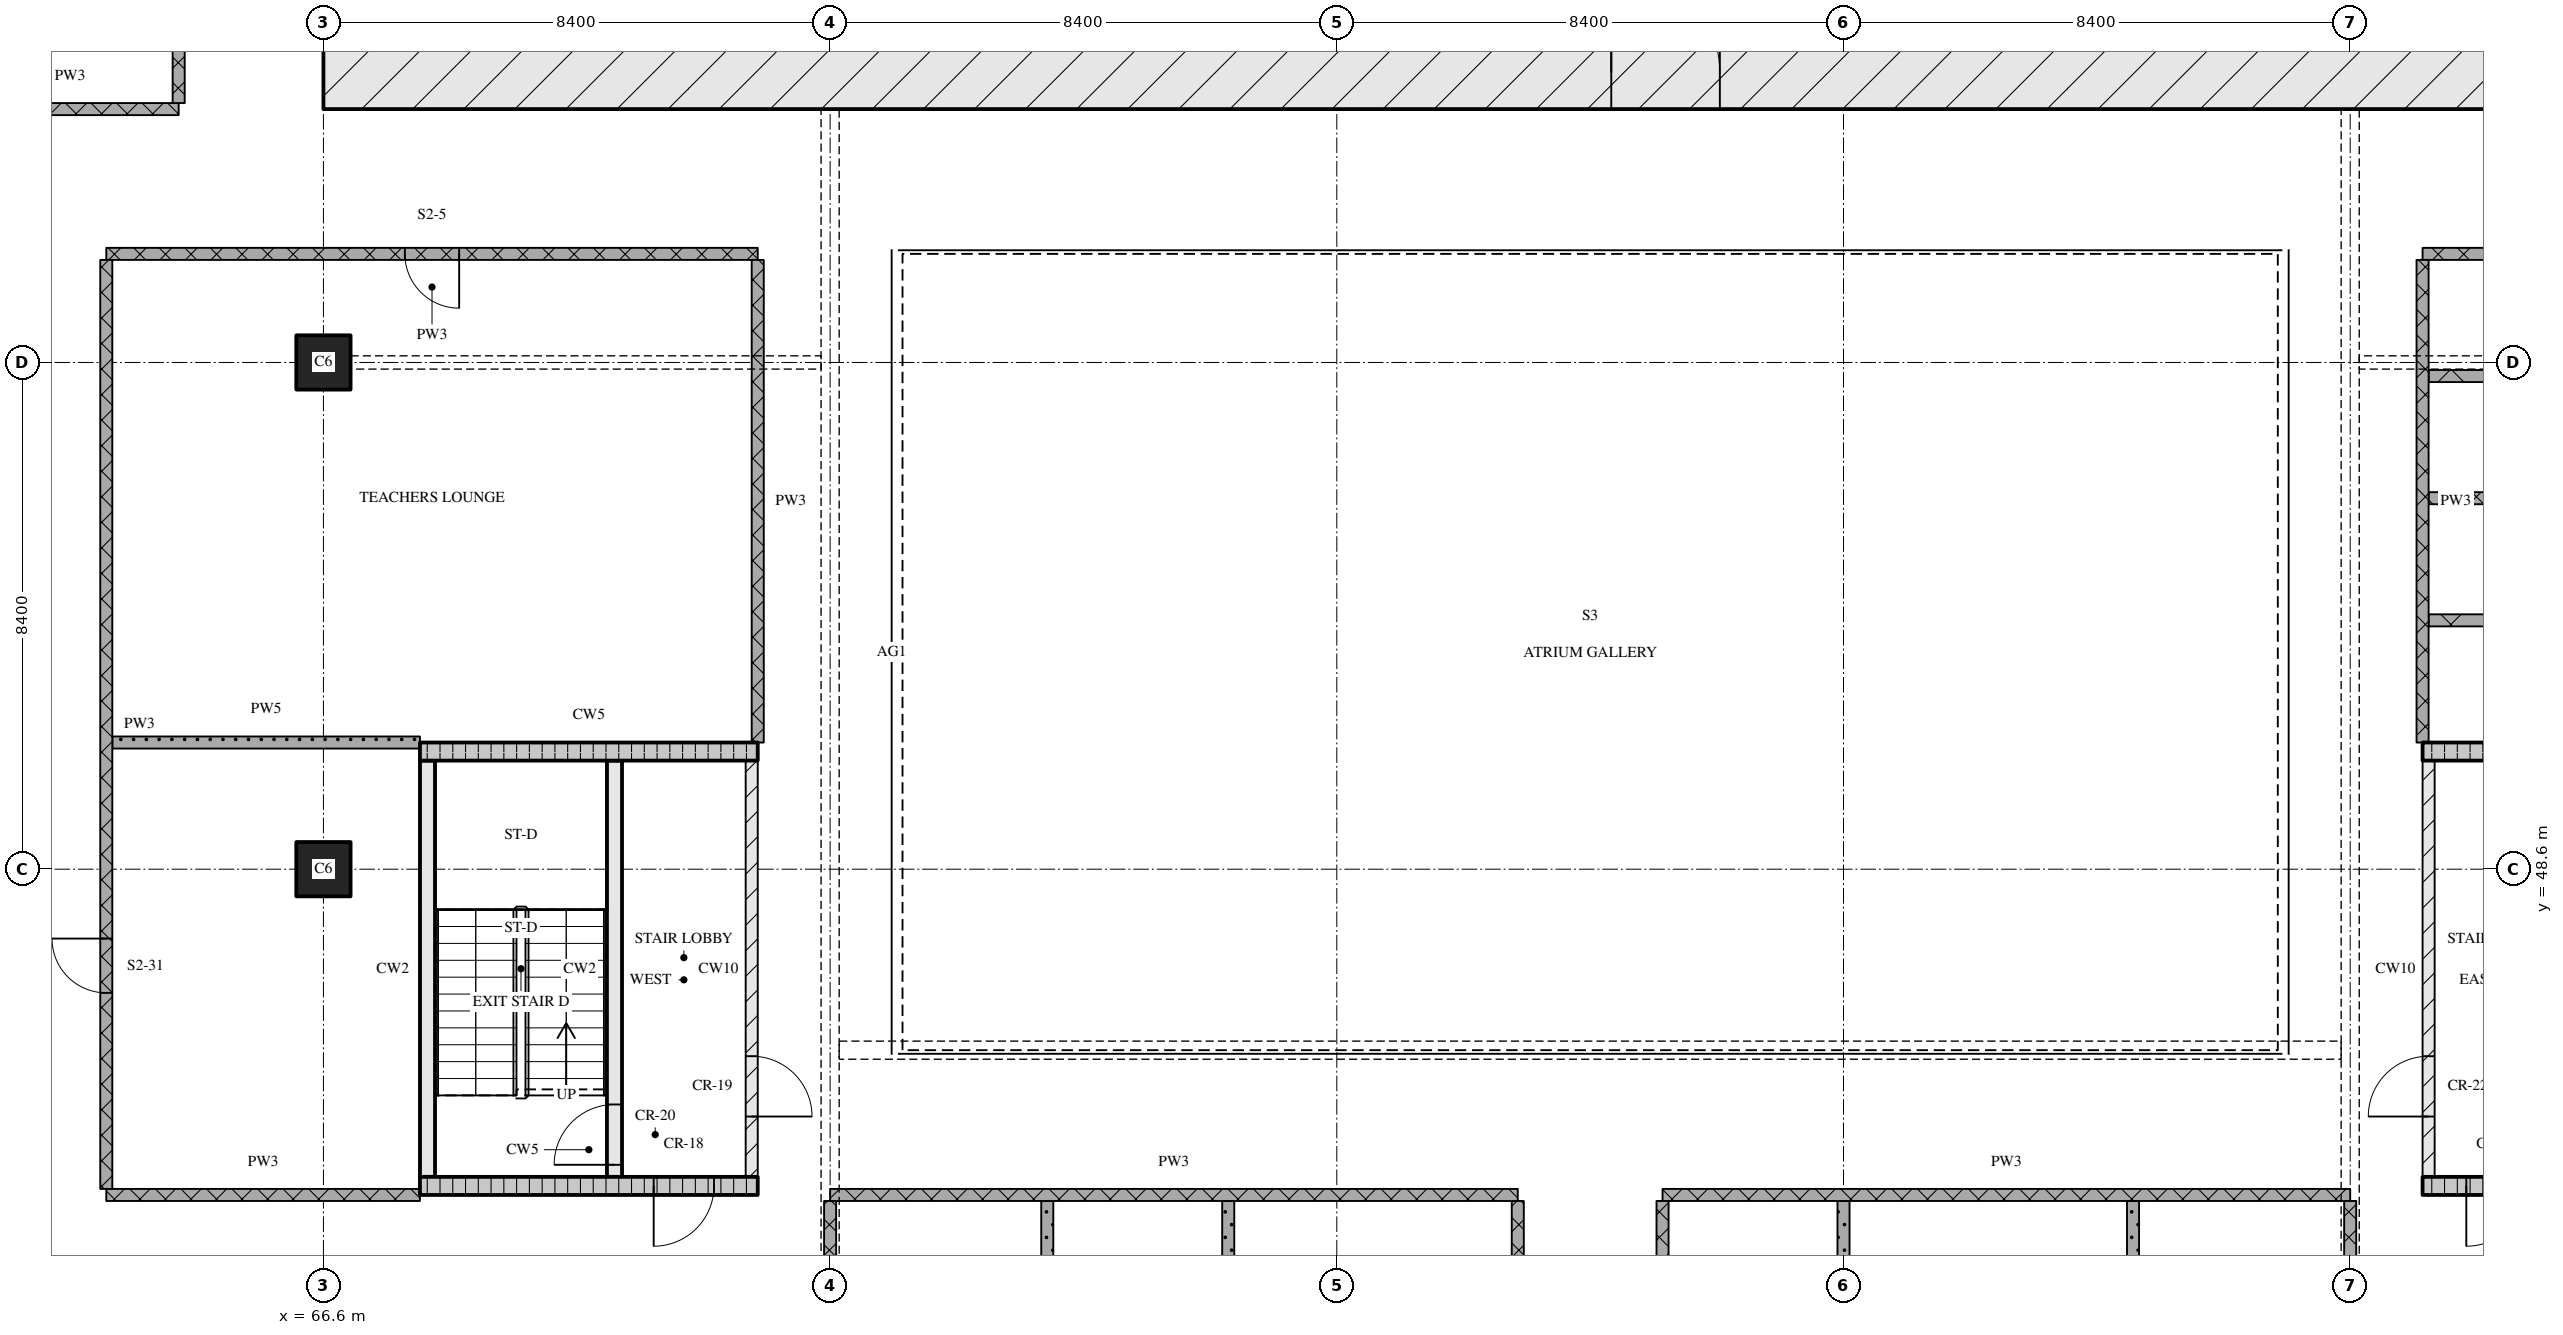
"""IFC4 building model, lengths in metres.
Left out: names, types, materials, properties, quantities, classifications, styles, units other than length and angle.
Written with IfcOpenShell. Run it as: python <this file> out.ifc"""

import sys

from ifc_helpers import new_model, si_unit, direction, frame, frame_2d, origin, origin_2d, place, context, subcontext, project, spatial, rectangle, extrude, element, fill, save


model = new_model("IFC4")
c1 = context("Model", 3, precision=1e-05, world=origin(), true_north=direction((0.0, 1.0)))
c2 = subcontext(c1, "Body", "Model", "MODEL_VIEW")
j1 = project(units=[si_unit("LENGTHUNIT", "METRE"), si_unit("PLANEANGLEUNIT", "RADIAN")], contexts=[c1])
p1 = place(None, origin())
s1 = spatial("IfcSite", under=j1, at=p1, CompositionType="ELEMENT")
p2 = place(p1, origin())
s2 = spatial("IfcBuilding", under=s1, at=p2, CompositionType="ELEMENT")
p3 = place(p2, frame((0.0, 0.0, 23.7)))
s3 = spatial("IfcBuildingStorey", under=s2, at=p3, CompositionType="ELEMENT", Elevation=23.7)
for number, where, z_axis, x_axis in (
    (1, (66.6, 48.6, 0.0), (0.0, 0.0, 1.0), (1.0, 0.0, 0.0)),
    (2, (66.6, 57.0, 0.0), (0.0, 0.0, 1.0), (1.0, 0.0, 0.0)),
):
    element("IfcColumn", number, at=place(p3, frame(where, z_axis=z_axis, x_axis=x_axis)), inside=s3, PredefinedType="COLUMN", context=c2, shape_type="SweptSolid", body=[
        extrude(rectangle(XDim=0.9, YDim=0.9, at=origin_2d()), origin(), (0.0, 0.0, 1.0), 4.5),
    ])
p4 = place(p3, frame((66.6, 61.8, 0.0), z_axis=(0.0, 0.0, 1.0), x_axis=(1.0, 0.0, 0.0)))
e3 = element("IfcWall", 3, at=p4, inside=s3, PredefinedType="SOLIDWALL", context=c2, shape_type="SweptSolid", body=[
    extrude(rectangle(XDim=42.0, YDim=1.2, at=frame_2d((21.0, 0.0))), origin(), (0.0, 0.0, 1.0), 4.2),
])
p5 = place(p4, frame((21.35, 0.0, 0.0)))
e4 = element("IfcOpeningElement", 4, at=p5, cuts=e3, PredefinedType="OPENING", context=c2, shape_type="SweptSolid", body=[
    extrude(rectangle(XDim=1.8, YDim=2.1, at=frame_2d((0.9, 1.05))), frame((0.0, 0.61, 0.0), z_axis=(0.0, -1.0, 0.0), x_axis=(1.0, 0.0, 0.0)), (0.0, 0.0, 1.0), 1.22),
])
p6 = place(p3, frame((68.2, 43.35, 0.0), z_axis=(0.0, 0.0, 1.0), x_axis=(1.0, 0.0, 0.0)))
e5 = element("IfcWall", 5, at=p6, inside=s3, PredefinedType="SOLIDWALL", context=c2, shape_type="SweptSolid", body=[
    extrude(rectangle(XDim=5.6, YDim=0.3, at=frame_2d((2.8, 0.0))), origin(), (0.0, 0.0, 1.0), 4.2),
])
p7 = place(p6, frame((3.875, 0.0, 0.0)))
e6 = element("IfcOpeningElement", 6, at=p7, cuts=e5, PredefinedType="OPENING", context=c2, shape_type="SweptSolid", body=[
    extrude(rectangle(XDim=1.0, YDim=2.1, at=frame_2d((0.5, 1.05))), frame((0.0, 0.16, 0.0), z_axis=(0.0, -1.0, 0.0), x_axis=(1.0, 0.0, 0.0)), (0.0, 0.0, 1.0), 0.32),
])
p8 = place(p3, frame((68.325, 43.5, 0.0), z_axis=(0.0, 0.0, 1.0), x_axis=(0.0, 1.0, 0.0)))
e7 = element("IfcWall", 7, at=p8, inside=s3, PredefinedType="SOLIDWALL", context=c2, shape_type="SweptSolid", body=[
    extrude(rectangle(XDim=6.9, YDim=0.25, at=frame_2d((3.45, 0.0))), origin(), (0.0, 0.0, 1.0), 4.2),
])
p9 = place(p3, frame((71.425, 43.5, 0.0), z_axis=(0.0, 0.0, 1.0), x_axis=(0.0, 1.0, 0.0)))
e8 = element("IfcWall", 8, at=p9, inside=s3, PredefinedType="SOLIDWALL", context=c2, shape_type="SweptSolid", body=[
    extrude(rectangle(XDim=6.9, YDim=0.25, at=frame_2d((3.45, 0.0))), origin(), (0.0, 0.0, 1.0), 4.2),
])
p10 = place(p9, frame((0.2, 0.0, 0.0)))
e9 = element("IfcOpeningElement", 9, at=p10, cuts=e8, PredefinedType="OPENING", context=c2, shape_type="SweptSolid", body=[
    extrude(rectangle(XDim=1.0, YDim=2.1, at=frame_2d((0.5, 1.05))), frame((0.0, 0.135, 0.0), z_axis=(0.0, -1.0, 0.0), x_axis=(1.0, 0.0, 0.0)), (0.0, 0.0, 1.0), 0.27),
])
p11 = place(p3, frame((73.7, 43.5, 0.0), z_axis=(0.0, 0.0, 1.0), x_axis=(0.0, 1.0, 0.0)))
e10 = element("IfcWall", 10, at=p11, inside=s3, PredefinedType="PARTITIONING", context=c2, shape_type="SweptSolid", body=[
    extrude(rectangle(XDim=6.9, YDim=0.2, at=frame_2d((3.45, 0.0))), origin(), (0.0, 0.0, 1.0), 4.2),
])
p12 = place(p11, frame((1.0, 0.0, 0.0)))
e11 = element("IfcOpeningElement", 11, at=p12, cuts=e10, PredefinedType="OPENING", context=c2, shape_type="SweptSolid", body=[
    extrude(rectangle(XDim=1.0, YDim=2.1, at=frame_2d((0.5, 1.05))), frame((0.0, 0.11, 0.0), z_axis=(0.0, -1.0, 0.0), x_axis=(1.0, 0.0, 0.0)), (0.0, 0.0, 1.0), 0.22),
])
p13 = place(p3, frame((68.2, 50.55, 0.0), z_axis=(0.0, 0.0, 1.0), x_axis=(1.0, 0.0, 0.0)))
e12 = element("IfcWall", 12, at=p13, inside=s3, PredefinedType="SOLIDWALL", context=c2, shape_type="SweptSolid", body=[
    extrude(rectangle(XDim=5.6, YDim=0.3, at=frame_2d((2.8, 0.0))), origin(), (0.0, 0.0, 1.0), 4.2),
])
p14 = place(p3, frame((101.4, 43.35, 0.0), z_axis=(0.0, 0.0, 1.0), x_axis=(1.0, 0.0, 0.0)))
e13 = element("IfcWall", 13, at=p14, inside=s3, PredefinedType="SOLIDWALL", context=c2, shape_type="SweptSolid", body=[
    extrude(rectangle(XDim=5.6, YDim=0.3, at=frame_2d((2.8, 0.0))), origin(), (0.0, 0.0, 1.0), 4.2),
])
p15 = place(p14, frame((0.725, 0.0, 0.0)))
e14 = element("IfcOpeningElement", 14, at=p15, cuts=e13, PredefinedType="OPENING", context=c2, shape_type="SweptSolid", body=[
    extrude(rectangle(XDim=1.0, YDim=2.1, at=frame_2d((0.5, 1.05))), frame((0.0, 0.16, 0.0), z_axis=(0.0, -1.0, 0.0), x_axis=(1.0, 0.0, 0.0)), (0.0, 0.0, 1.0), 0.32),
])
p16 = place(p3, frame((101.5, 43.5, 0.0), z_axis=(0.0, 0.0, 1.0), x_axis=(0.0, 1.0, 0.0)))
e15 = element("IfcWall", 15, at=p16, inside=s3, PredefinedType="PARTITIONING", context=c2, shape_type="SweptSolid", body=[
    extrude(rectangle(XDim=6.9, YDim=0.2, at=frame_2d((3.45, 0.0))), origin(), (0.0, 0.0, 1.0), 4.2),
])
p17 = place(p16, frame((1.0, 0.0, 0.0)))
e16 = element("IfcOpeningElement", 16, at=p17, cuts=e15, PredefinedType="OPENING", context=c2, shape_type="SweptSolid", body=[
    extrude(rectangle(XDim=1.0, YDim=2.1, at=frame_2d((0.5, 1.05))), frame((0.0, 0.11, 0.0), z_axis=(0.0, -1.0, 0.0), x_axis=(1.0, 0.0, 0.0)), (0.0, 0.0, 1.0), 0.22),
])
p18 = place(p3, frame((101.4, 50.55, 0.0), z_axis=(0.0, 0.0, 1.0), x_axis=(1.0, 0.0, 0.0)))
e17 = element("IfcWall", 17, at=p18, inside=s3, PredefinedType="SOLIDWALL", context=c2, shape_type="SweptSolid", body=[
    extrude(rectangle(XDim=5.6, YDim=0.3, at=frame_2d((2.8, 0.0))), origin(), (0.0, 0.0, 1.0), 4.2),
])
p19 = place(p3, frame((63.0, 43.2, 0.0), z_axis=(0.0, 0.0, 1.0), x_axis=(1.0, 0.0, 0.0)))
e18 = element("IfcWall", 18, at=p19, inside=s3, PredefinedType="PARTITIONING", context=c2, shape_type="SweptSolid", body=[
    extrude(rectangle(XDim=5.2, YDim=0.2, at=frame_2d((2.6, 0.0))), origin(), (0.0, 0.0, 1.0), 4.2),
])
for number, where, z_axis, x_axis in (
    (19, (75.0, 43.2, 0.0), (0.0, 0.0, 1.0), (1.0, 0.0, 0.0)),
    (20, (88.8, 43.2, 0.0), (0.0, 0.0, 1.0), (1.0, 0.0, 0.0)),
):
    element("IfcWall", number, at=place(p3, frame(where, z_axis=z_axis, x_axis=x_axis)), inside=s3, PredefinedType="PARTITIONING", context=c2, shape_type="SweptSolid", body=[
        extrude(rectangle(XDim=11.4, YDim=0.2, at=frame_2d((5.7, 0.0))), origin(), (0.0, 0.0, 1.0), 4.2),
    ])
p20 = place(p3, frame((63.1, 50.7, 0.0), z_axis=(0.0, 0.0, 1.0), x_axis=(1.0, 0.0, 0.0)))
e21 = element("IfcWall", 21, at=p20, inside=s3, PredefinedType="PARTITIONING", context=c2, shape_type="SweptSolid", body=[
    extrude(rectangle(XDim=5.1, YDim=0.2, at=frame_2d((2.55, 0.0))), origin(), (0.0, 0.0, 1.0), 4.2),
])
for number, where, z_axis, x_axis in (
    (22, (101.5, 52.725, 0.0), (0.0, 0.0, 1.0), (1.0, 0.0, 0.0)),
    (23, (101.5, 54.75, 0.0), (0.0, 0.0, 1.0), (1.0, 0.0, 0.0)),
):
    element("IfcWall", number, at=place(p3, frame(where, z_axis=z_axis, x_axis=x_axis)), inside=s3, PredefinedType="PARTITIONING", context=c2, shape_type="SweptSolid", body=[
        extrude(rectangle(XDim=10.6, YDim=0.2, at=frame_2d((5.3, 0.0))), origin(), (0.0, 0.0, 1.0), 4.2),
    ])
p21 = place(p3, frame((101.5, 56.775, 0.0), z_axis=(0.0, 0.0, 1.0), x_axis=(1.0, 0.0, 0.0)))
e24 = element("IfcWall", 24, at=p21, inside=s3, PredefinedType="PARTITIONING", context=c2, shape_type="SweptSolid", body=[
    extrude(rectangle(XDim=6.63, YDim=0.2, at=frame_2d((3.315, 0.0))), origin(), (0.0, 0.0, 1.0), 4.2),
])
p22 = place(p3, frame((73.8, 58.8, 0.0), z_axis=(0.0, 0.0, 1.0), x_axis=(-1.0, 0.0, 0.0)))
e25 = element("IfcWall", 25, at=p22, inside=s3, PredefinedType="PARTITIONING", context=c2, shape_type="SweptSolid", body=[
    extrude(rectangle(XDim=10.8, YDim=0.2, at=frame_2d((5.4, 0.0))), origin(), (0.0, 0.0, 1.0), 4.2),
])
p23 = place(p22, frame((4.95, 0.0, 0.0)))
e26 = element("IfcOpeningElement", 26, at=p23, cuts=e25, PredefinedType="OPENING", context=c2, shape_type="SweptSolid", body=[
    extrude(rectangle(XDim=0.9, YDim=2.1, at=frame_2d((0.45, 1.05))), frame((0.0, 0.11, 0.0), z_axis=(0.0, -1.0, 0.0), x_axis=(1.0, 0.0, 0.0)), (0.0, 0.0, 1.0), 0.22),
])
p24 = place(p3, frame((101.4, 58.8, 0.0), z_axis=(0.0, 0.0, 1.0), x_axis=(1.0, 0.0, 0.0)))
e27 = element("IfcWall", 27, at=p24, inside=s3, PredefinedType="PARTITIONING", context=c2, shape_type="SweptSolid", body=[
    extrude(rectangle(XDim=10.8, YDim=0.2, at=frame_2d((5.4, 0.0))), origin(), (0.0, 0.0, 1.0), 4.2),
])
p25 = place(p3, frame((60.6, 61.2, 0.0), z_axis=(0.0, 0.0, 1.0), x_axis=(1.0, 0.0, 0.0)))
e28 = element("IfcWall", 28, at=p25, inside=s3, PredefinedType="PARTITIONING", context=c2, shape_type="SweptSolid", body=[
    extrude(rectangle(XDim=3.6, YDim=0.2, at=frame_2d((1.8, 0.0))), origin(), (0.0, 0.0, 1.0), 4.2),
])
p26 = place(p3, frame((63.0, 58.7, 0.0), z_axis=(0.0, 0.0, 1.0), x_axis=(0.0, -1.0, 0.0)))
e29 = element("IfcWall", 29, at=p26, inside=s3, PredefinedType="PARTITIONING", context=c2, shape_type="SweptSolid", body=[
    extrude(rectangle(XDim=15.4, YDim=0.2, at=frame_2d((7.7, 0.0))), origin(), (0.0, 0.0, 1.0), 4.2),
])
p27 = place(p26, frame((11.25, 0.0, 0.0)))
e30 = element("IfcOpeningElement", 30, at=p27, cuts=e29, PredefinedType="OPENING", context=c2, shape_type="SweptSolid", body=[
    extrude(rectangle(XDim=0.9, YDim=2.1, at=frame_2d((0.45, 1.05))), frame((0.0, 0.11, 0.0), z_axis=(0.0, -1.0, 0.0), x_axis=(1.0, 0.0, 0.0)), (0.0, 0.0, 1.0), 0.22),
])
p28 = place(p3, frame((64.2, 67.7, 0.0), z_axis=(0.0, 0.0, 1.0), x_axis=(0.0, -1.0, 0.0)))
e31 = element("IfcWall", 31, at=p28, inside=s3, PredefinedType="PARTITIONING", context=c2, shape_type="SweptSolid", body=[
    extrude(rectangle(XDim=6.4, YDim=0.2, at=frame_2d((3.2, 0.0))), origin(), (0.0, 0.0, 1.0), 4.2),
])
p29 = place(p3, frame((73.8, 58.7, 0.0), z_axis=(0.0, 0.0, 1.0), x_axis=(0.0, -1.0, 0.0)))
e32 = element("IfcWall", 32, at=p29, inside=s3, PredefinedType="PARTITIONING", context=c2, shape_type="SweptSolid", body=[
    extrude(rectangle(XDim=8.0, YDim=0.2, at=frame_2d((4.0, 0.0))), origin(), (0.0, 0.0, 1.0), 4.2),
])
p30 = place(p3, frame((75.0, 43.1, 0.0), z_axis=(0.0, 0.0, 1.0), x_axis=(0.0, -1.0, 0.0)))
e33 = element("IfcWall", 33, at=p30, inside=s3, PredefinedType="PARTITIONING", context=c2, shape_type="SweptSolid", body=[
    extrude(rectangle(XDim=2.2, YDim=0.2, at=frame_2d((1.1, 0.0))), origin(), (0.0, 0.0, 1.0), 3.3),
])
for number, where, z_axis, x_axis in (
    (34, (78.6, 43.1, 0.0), (0.0, 0.0, 1.0), (0.0, -1.0, 0.0)),
    (35, (81.6, 43.1, 0.0), (0.0, 0.0, 1.0), (0.0, -1.0, 0.0)),
    (36, (86.4, 43.1, 0.0), (0.0, 0.0, 1.0), (0.0, -1.0, 0.0)),
):
    element("IfcWall", number, at=place(p3, frame(where, z_axis=z_axis, x_axis=x_axis)), inside=s3, PredefinedType="PARTITIONING", context=c2, shape_type="SweptSolid", body=[
        extrude(rectangle(XDim=4.6, YDim=0.2, at=frame_2d((2.3, 0.0))), origin(), (0.0, 0.0, 1.0), 4.2),
    ])
p31 = place(p3, frame((88.8, 43.1, 0.0), z_axis=(0.0, 0.0, 1.0), x_axis=(0.0, -1.0, 0.0)))
e37 = element("IfcWall", 37, at=p31, inside=s3, PredefinedType="PARTITIONING", context=c2, shape_type="SweptSolid", body=[
    extrude(rectangle(XDim=4.6, YDim=0.2, at=frame_2d((2.3, 0.0))), origin(), (0.0, 0.0, 1.0), 4.2),
])
p32 = place(p31, frame((1.85, 0.0, 0.0)))
e38 = element("IfcOpeningElement", 38, at=p32, cuts=e37, PredefinedType="OPENING", context=c2, shape_type="SweptSolid", body=[
    extrude(rectangle(XDim=0.9, YDim=2.1, at=frame_2d((0.45, 1.05))), frame((0.0, 0.11, 0.0), z_axis=(0.0, -1.0, 0.0), x_axis=(1.0, 0.0, 0.0)), (0.0, 0.0, 1.0), 0.22),
])
p33 = place(p3, frame((91.8, 43.1, 0.0), z_axis=(0.0, 0.0, 1.0), x_axis=(0.0, -1.0, 0.0)))
e39 = element("IfcWall", 39, at=p33, inside=s3, PredefinedType="PARTITIONING", context=c2, shape_type="SweptSolid", body=[
    extrude(rectangle(XDim=2.43, YDim=0.2, at=frame_2d((1.215, 0.0))), origin(), (0.0, 0.0, 1.0), 4.2),
])
p34 = place(p3, frame((96.6, 43.1, 0.0), z_axis=(0.0, 0.0, 1.0), x_axis=(0.0, -1.0, 0.0)))
e40 = element("IfcWall", 40, at=p34, inside=s3, PredefinedType="PARTITIONING", context=c2, shape_type="SweptSolid", body=[
    extrude(rectangle(XDim=4.6, YDim=0.2, at=frame_2d((2.3, 0.0))), origin(), (0.0, 0.0, 1.0), 4.2),
])
p35 = place(p3, frame((100.2, 43.1, 0.0), z_axis=(0.0, 0.0, 1.0), x_axis=(0.0, -1.0, 0.0)))
e41 = element("IfcWall", 41, at=p35, inside=s3, PredefinedType="PARTITIONING", context=c2, shape_type="SweptSolid", body=[
    extrude(rectangle(XDim=2.2, YDim=0.2, at=frame_2d((1.1, 0.0))), origin(), (0.0, 0.0, 1.0), 3.3),
])
p36 = place(p3, frame((101.4, 58.7, 0.0), z_axis=(0.0, 0.0, 1.0), x_axis=(0.0, -1.0, 0.0)))
e42 = element("IfcWall", 42, at=p36, inside=s3, PredefinedType="PARTITIONING", context=c2, shape_type="SweptSolid", body=[
    extrude(rectangle(XDim=8.0, YDim=0.2, at=frame_2d((4.0, 0.0))), origin(), (0.0, 0.0, 1.0), 4.2),
])
p37 = place(p5, origin())
e43 = element("IfcDoor", 43, at=p37, inside=s3, OperationType="DOUBLE_DOOR_SINGLE_SWING", PredefinedType="DOOR", context=c2, shape_type="SweptSolid", body=[
    extrude(rectangle(XDim=1.8, YDim=2.1, at=frame_2d((0.9, 1.05))), frame((0.0, 0.025, 0.0), z_axis=(0.0, -1.0, 0.0), x_axis=(1.0, 0.0, 0.0)), (0.0, 0.0, 1.0), 0.05),
])
fill(e4, e43)
p38 = place(p7, origin())
e44 = element("IfcDoor", 44, at=p38, inside=s3, OperationType="SINGLE_SWING_RIGHT", PredefinedType="DOOR", context=c2, shape_type="SweptSolid", body=[
    extrude(rectangle(XDim=1.0, YDim=2.1, at=frame_2d((0.5, 1.05))), frame((0.0, 0.025, 0.0), z_axis=(0.0, -1.0, 0.0), x_axis=(1.0, 0.0, 0.0)), (0.0, 0.0, 1.0), 0.05),
])
fill(e6, e44)
p39 = place(p10, origin())
e45 = element("IfcDoor", 45, at=p39, inside=s3, OperationType="SINGLE_SWING_LEFT", PredefinedType="DOOR", context=c2, shape_type="SweptSolid", body=[
    extrude(rectangle(XDim=1.0, YDim=2.1, at=frame_2d((0.5, 1.05))), frame((0.0, 0.025, 0.0), z_axis=(0.0, -1.0, 0.0), x_axis=(1.0, 0.0, 0.0)), (0.0, 0.0, 1.0), 0.05),
])
fill(e9, e45)
p40 = place(p12, origin())
e46 = element("IfcDoor", 46, at=p40, inside=s3, OperationType="SINGLE_SWING_RIGHT", PredefinedType="DOOR", context=c2, shape_type="SweptSolid", body=[
    extrude(rectangle(XDim=1.0, YDim=2.1, at=frame_2d((0.5, 1.05))), frame((0.0, 0.025, 0.0), z_axis=(0.0, -1.0, 0.0), x_axis=(1.0, 0.0, 0.0)), (0.0, 0.0, 1.0), 0.05),
])
fill(e11, e46)
p41 = place(p15, origin())
e47 = element("IfcDoor", 47, at=p41, inside=s3, OperationType="SINGLE_SWING_RIGHT", PredefinedType="DOOR", context=c2, shape_type="SweptSolid", body=[
    extrude(rectangle(XDim=1.0, YDim=2.1, at=frame_2d((0.5, 1.05))), frame((0.0, 0.025, 0.0), z_axis=(0.0, -1.0, 0.0), x_axis=(1.0, 0.0, 0.0)), (0.0, 0.0, 1.0), 0.05),
])
fill(e14, e47)
p42 = place(p17, origin())
e48 = element("IfcDoor", 48, at=p42, inside=s3, OperationType="SINGLE_SWING_LEFT", PredefinedType="DOOR", context=c2, shape_type="SweptSolid", body=[
    extrude(rectangle(XDim=1.0, YDim=2.1, at=frame_2d((0.5, 1.05))), frame((0.0, 0.025, 0.0), z_axis=(0.0, -1.0, 0.0), x_axis=(1.0, 0.0, 0.0)), (0.0, 0.0, 1.0), 0.05),
])
fill(e16, e48)
p43 = place(p23, origin())
e49 = element("IfcDoor", 49, at=p43, inside=s3, OperationType="SINGLE_SWING_LEFT", PredefinedType="DOOR", context=c2, shape_type="SweptSolid", body=[
    extrude(rectangle(XDim=0.9, YDim=2.1, at=frame_2d((0.45, 1.05))), frame((0.0, 0.025, 0.0), z_axis=(0.0, -1.0, 0.0), x_axis=(1.0, 0.0, 0.0)), (0.0, 0.0, 1.0), 0.05),
])
fill(e26, e49)
p44 = place(p27, origin())
e50 = element("IfcDoor", 50, at=p44, inside=s3, OperationType="SINGLE_SWING_RIGHT", PredefinedType="DOOR", context=c2, shape_type="SweptSolid", body=[
    extrude(rectangle(XDim=0.9, YDim=2.1, at=frame_2d((0.45, 1.05))), frame((0.0, 0.025, 0.0), z_axis=(0.0, -1.0, 0.0), x_axis=(1.0, 0.0, 0.0)), (0.0, 0.0, 1.0), 0.05),
])
fill(e30, e50)
save(model, sys.argv[1])
